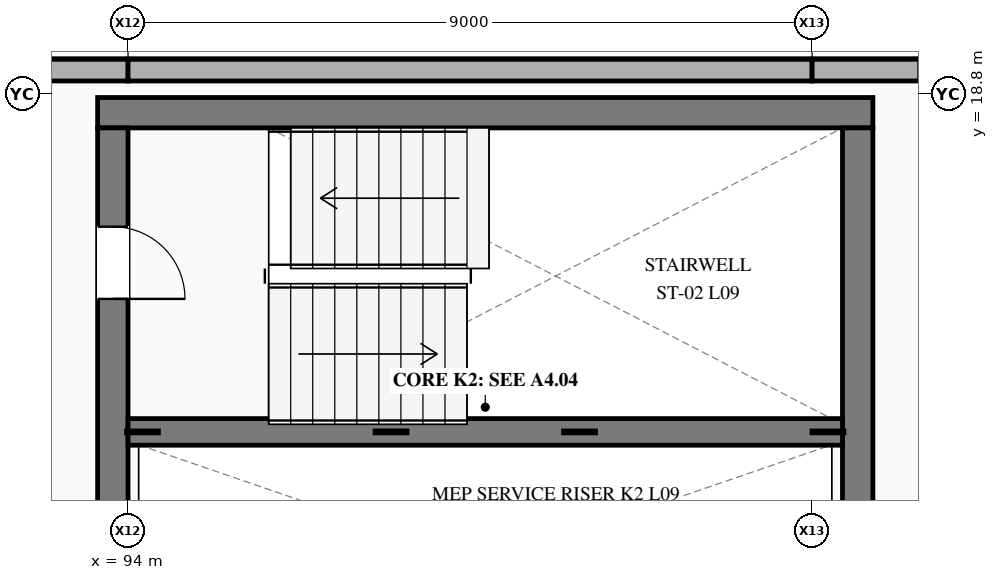
"""IFC4 building model, lengths in metres.
Left out: names, types, materials, properties, quantities, classifications, styles, units other than length and angle.
Written with IfcOpenShell. Run it as: python <this file> out.ifc"""

import sys

from ifc_helpers import new_model, si_unit, direction, frame, frame_2d, origin, place, context, subcontext, project, spatial, rectangle, extrude, element, fill, save


model = new_model("IFC4")
c1 = context("Model", 3, precision=1e-05, world=origin(), true_north=direction((0.0, 1.0)))
c2 = subcontext(c1, "Body", "Model", "MODEL_VIEW")
j1 = project(units=[si_unit("LENGTHUNIT", "METRE"), si_unit("PLANEANGLEUNIT", "RADIAN")], contexts=[c1])
p1 = place(None, origin())
s1 = spatial("IfcSite", under=j1, at=p1, CompositionType="ELEMENT")
p2 = place(p1, origin())
s2 = spatial("IfcBuilding", under=s1, at=p2, CompositionType="ELEMENT")
p3 = place(p2, frame((0.0, 0.0, 37.6)))
s3 = spatial("IfcBuildingStorey", under=s2, at=p3, CompositionType="ELEMENT", Elevation=37.6)
for number, where, z_axis, x_axis in (
    (1, (94.0, 19.11, 0.0), (0.0, 0.0, 1.0), (-1.0, 0.0, 0.0)),
    (2, (103.0, 19.11, 0.0), (0.0, 0.0, 1.0), (-1.0, 0.0, 0.0)),
):
    element("IfcWall", number, at=place(p3, frame(where, z_axis=z_axis, x_axis=x_axis)), inside=s3, PredefinedType="STANDARD", context=c2, shape_type="SweptSolid", body=[
        extrude(rectangle(XDim=9.0, YDim=0.285, at=frame_2d((4.5, 0.0))), origin(), (0.0, 0.0, 1.0), 3.5),
    ])
p4 = place(p3, frame((112.0, 19.11, 0.0), z_axis=(0.0, 0.0, 1.0), x_axis=(-1.0, 0.0, 0.0)))
e3 = element("IfcWall", 3, at=p4, inside=s3, PredefinedType="STANDARD", context=c2, shape_type="SweptSolid", body=[
    extrude(rectangle(XDim=9.0, YDim=0.285, at=frame_2d((4.5, 0.0))), origin(), (0.0, 0.0, 1.0), 3.5),
])
p5 = place(p4, frame((5.6, 0.0, 0.85)))
e4 = element("IfcOpeningElement", 4, at=p5, cuts=e3, PredefinedType="OPENING", context=c2, shape_type="SweptSolid", body=[
    extrude(rectangle(XDim=2.0, YDim=1.65, at=frame_2d((1.0, 0.825))), frame((0.0, 0.152, 0.0), z_axis=(0.0, -1.0, 0.0), x_axis=(1.0, 0.0, 0.0)), (0.0, 0.0, 1.0), 0.305),
])
p6 = place(p4, frame((1.4, 0.0, 0.85)))
e5 = element("IfcOpeningElement", 5, at=p6, cuts=e3, PredefinedType="OPENING", context=c2, shape_type="SweptSolid", body=[
    extrude(rectangle(XDim=2.0, YDim=1.65, at=frame_2d((1.0, 0.825))), frame((0.0, 0.152, 0.0), z_axis=(0.0, -1.0, 0.0), x_axis=(1.0, 0.0, 0.0)), (0.0, 0.0, 1.0), 0.305),
])
p7 = place(p3, frame((103.8, 18.55, 0.0), z_axis=(0.0, 0.0, 1.0), x_axis=(-1.0, 0.0, 0.0)))
e6 = element("IfcWall", 6, at=p7, inside=s3, PredefinedType="SHEAR", context=c2, shape_type="SweptSolid", body=[
    extrude(rectangle(XDim=10.2, YDim=0.4, at=frame_2d((5.1, 0.0))), origin(), (0.0, 0.0, 1.0), 3.5),
])
p8 = place(p3, frame((93.8, 18.35, 0.0), z_axis=(0.0, 0.0, 1.0), x_axis=(0.0, -1.0, 0.0)))
e7 = element("IfcWall", 7, at=p8, inside=s3, PredefinedType="SHEAR", context=c2, shape_type="SweptSolid", body=[
    extrude(rectangle(XDim=7.35, YDim=0.4, at=frame_2d((3.675, 0.0))), origin(), (0.0, 0.0, 1.0), 3.5),
])
p9 = place(p8, frame((1.3, 0.0, 0.0)))
e8 = element("IfcOpeningElement", 8, at=p9, cuts=e7, PredefinedType="OPENING", context=c2, shape_type="SweptSolid", body=[
    extrude(rectangle(XDim=0.95, YDim=2.2, at=frame_2d((0.475, 1.1))), frame((0.0, 0.21, 0.0), z_axis=(0.0, -1.0, 0.0), x_axis=(1.0, 0.0, 0.0)), (0.0, 0.0, 1.0), 0.42),
])
p10 = place(p3, frame((103.6, 11.0, 0.0), z_axis=(0.0, 0.0, 1.0), x_axis=(0.0, 1.0, 0.0)))
e9 = element("IfcWall", 9, at=p10, inside=s3, PredefinedType="SHEAR", context=c2, shape_type="SweptSolid", body=[
    extrude(rectangle(XDim=7.35, YDim=0.4, at=frame_2d((3.675, 0.0))), origin(), (0.0, 0.0, 1.0), 3.5),
])
p11 = place(p3, frame((94.0, 14.35, 0.0), z_axis=(0.0, 0.0, 1.0), x_axis=(1.0, 0.0, 0.0)))
e10 = element("IfcWall", 10, at=p11, inside=s3, PredefinedType="SHEAR", context=c2, shape_type="SweptSolid", body=[
    extrude(rectangle(XDim=9.4, YDim=0.35, at=frame_2d((4.7, 0.0))), origin(), (0.0, 0.0, 1.0), 3.5),
])
p12 = place(p9, origin())
e11 = element("IfcDoor", 11, at=p12, inside=s3, OperationType="SINGLE_SWING_RIGHT", PredefinedType="DOOR", context=c2, shape_type="SweptSolid", body=[
    extrude(rectangle(XDim=0.95, YDim=2.2, at=frame_2d((0.475, 1.1))), frame((0.0, 0.025, 0.0), z_axis=(0.0, -1.0, 0.0), x_axis=(1.0, 0.0, 0.0)), (0.0, 0.0, 1.0), 0.05),
])
fill(e8, e11)
save(model, sys.argv[1])
